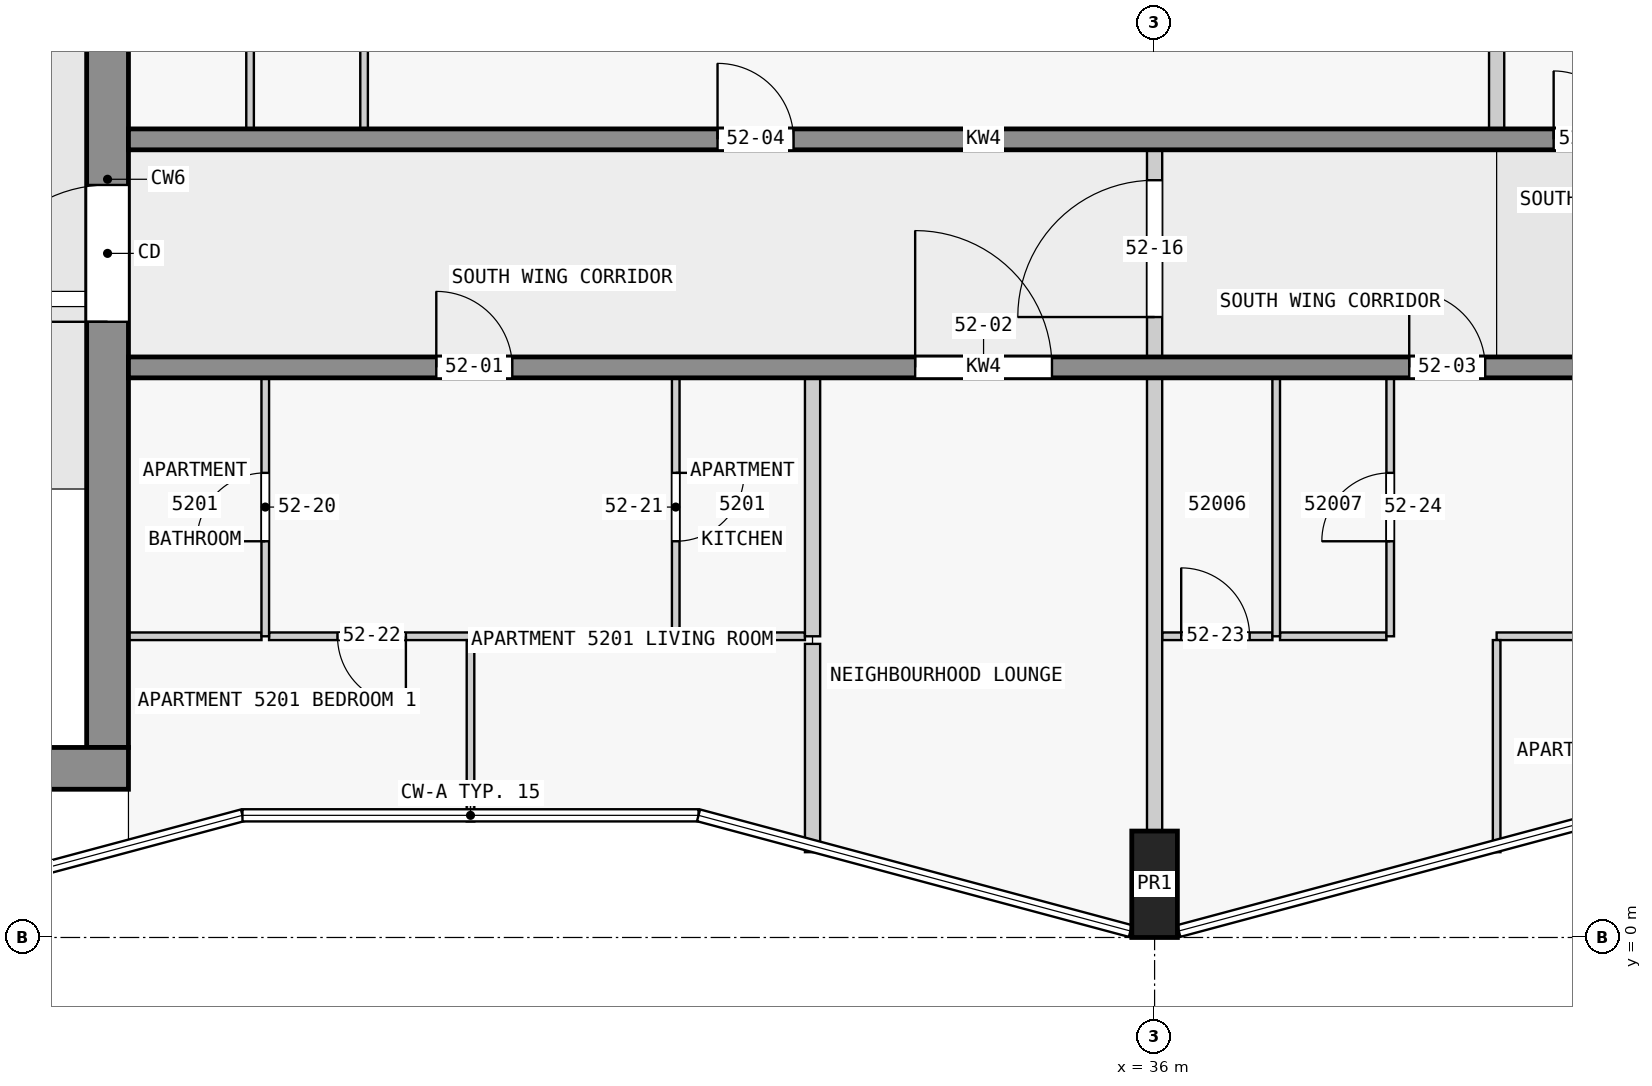
"""IFC4 building model, lengths in metres.
Left out: names, types, materials, properties, quantities, classifications, styles, units other than length and angle.
Written with IfcOpenShell. Run it as: python <this file> out.ifc"""

import sys

from ifc_helpers import new_model, si_unit, direction, frame, frame_2d, origin, origin_2d, place, context, subcontext, project, spatial, rectangle, extrude, element, fill, save


model = new_model("IFC4")
c1 = context("Model", 3, precision=1e-05, world=origin(), true_north=direction((0.0, 1.0)))
c2 = subcontext(c1, "Body", "Model", "MODEL_VIEW")
j1 = project(units=[si_unit("LENGTHUNIT", "METRE"), si_unit("PLANEANGLEUNIT", "RADIAN")], contexts=[c1])
p1 = place(None, origin())
s1 = spatial("IfcSite", under=j1, at=p1, CompositionType="ELEMENT")
p2 = place(p1, origin())
s2 = spatial("IfcBuilding", under=s1, at=p2, CompositionType="ELEMENT")
p3 = place(p2, frame((0.0, 0.0, 201.4)))
s3 = spatial("IfcBuildingStorey", under=s2, at=p3, CompositionType="ELEMENT", Elevation=201.4)
p4 = place(p3, frame((36.0, 0.7, 0.0), z_axis=(0.0, 0.0, 1.0), x_axis=(1.0, 0.0, 0.0)))
e1 = element("IfcColumn", 1, at=p4, inside=s3, PredefinedType="COLUMN", context=c2, shape_type="SweptSolid", body=[
    extrude(rectangle(XDim=0.6, YDim=1.4, at=origin_2d()), origin(), (0.0, 0.0, 1.0), 3.5),
])
p5 = place(p3, frame((1.75, 2.225, 0.0), z_axis=(0.0, 0.0, 1.0), x_axis=(1.0, 0.0, 0.0)))
e2 = element("IfcWall", 2, at=p5, inside=s3, PredefinedType="SHEAR", context=c2, shape_type="SweptSolid", body=[
    extrude(rectangle(XDim=20.75, YDim=0.55, at=frame_2d((10.375, 0.0))), origin(), (0.0, 0.0, 1.0), 3.25),
])
p6 = place(p3, frame((22.225, 2.5, 0.0), z_axis=(0.0, 0.0, 1.0), x_axis=(0.0, 1.0, 0.0)))
e3 = element("IfcWall", 3, at=p6, inside=s3, PredefinedType="SHEAR", context=c2, shape_type="SweptSolid", body=[
    extrude(rectangle(XDim=14.95, YDim=0.55, at=frame_2d((7.475, 0.0))), origin(), (0.0, 0.0, 1.0), 3.25),
])
p7 = place(p6, frame((5.6, 0.0, 0.0)))
e4 = element("IfcOpeningElement", 4, at=p7, cuts=e3, PredefinedType="OPENING", context=c2, shape_type="SweptSolid", body=[
    extrude(rectangle(XDim=1.8, YDim=2.1, at=frame_2d((0.9, 1.05))), frame((0.0, 0.285, 0.0), z_axis=(0.0, -1.0, 0.0), x_axis=(1.0, 0.0, 0.0)), (0.0, 0.0, 1.0), 0.57),
])
p8 = place(p3, frame((22.5, 7.5, 0.0), z_axis=(0.0, 0.0, 1.0), x_axis=(1.0, 0.0, 0.0)))
e5 = element("IfcWall", 5, at=p8, inside=s3, PredefinedType="SHEAR", context=c2, shape_type="SweptSolid", body=[
    extrude(rectangle(XDim=22.5, YDim=0.275, at=frame_2d((11.25, 0.0))), origin(), (0.0, 0.0, 1.0), 3.25),
])
p9 = place(p8, frame((4.05, 0.0, 0.0)))
e6 = element("IfcOpeningElement", 6, at=p9, cuts=e5, PredefinedType="OPENING", context=c2, shape_type="SweptSolid", body=[
    extrude(rectangle(XDim=1.0, YDim=2.1, at=frame_2d((0.5, 1.05))), frame((0.0, 0.147, 0.0), z_axis=(0.0, -1.0, 0.0), x_axis=(1.0, 0.0, 0.0)), (0.0, 0.0, 1.0), 0.295),
])
p10 = place(p8, frame((10.35, 0.0, 0.0)))
e7 = element("IfcOpeningElement", 7, at=p10, cuts=e5, PredefinedType="OPENING", context=c2, shape_type="SweptSolid", body=[
    extrude(rectangle(XDim=1.8, YDim=2.1, at=frame_2d((0.9, 1.05))), frame((0.0, 0.147, 0.0), z_axis=(0.0, -1.0, 0.0), x_axis=(1.0, 0.0, 0.0)), (0.0, 0.0, 1.0), 0.295),
])
p11 = place(p8, frame((16.85, 0.0, 0.0)))
e8 = element("IfcOpeningElement", 8, at=p11, cuts=e5, PredefinedType="OPENING", context=c2, shape_type="SweptSolid", body=[
    extrude(rectangle(XDim=1.0, YDim=2.1, at=frame_2d((0.5, 1.05))), frame((0.0, 0.147, 0.0), z_axis=(0.0, -1.0, 0.0), x_axis=(1.0, 0.0, 0.0)), (0.0, 0.0, 1.0), 0.295),
])
p12 = place(p3, frame((22.5, 10.5, 0.0), z_axis=(0.0, 0.0, 1.0), x_axis=(1.0, 0.0, 0.0)))
e9 = element("IfcWall", 9, at=p12, inside=s3, PredefinedType="SHEAR", context=c2, shape_type="SweptSolid", body=[
    extrude(rectangle(XDim=22.5, YDim=0.275, at=frame_2d((11.25, 0.0))), origin(), (0.0, 0.0, 1.0), 3.25),
])
p13 = place(p12, frame((7.75, 0.0, 0.0)))
e10 = element("IfcOpeningElement", 10, at=p13, cuts=e9, PredefinedType="OPENING", context=c2, shape_type="SweptSolid", body=[
    extrude(rectangle(XDim=1.0, YDim=2.1, at=frame_2d((0.5, 1.05))), frame((0.0, 0.147, 0.0), z_axis=(0.0, -1.0, 0.0), x_axis=(1.0, 0.0, 0.0)), (0.0, 0.0, 1.0), 0.295),
])
p14 = place(p12, frame((18.75, 0.0, 0.0)))
e11 = element("IfcOpeningElement", 11, at=p14, cuts=e9, PredefinedType="OPENING", context=c2, shape_type="SweptSolid", body=[
    extrude(rectangle(XDim=0.9, YDim=2.1, at=frame_2d((0.45, 1.05))), frame((0.0, 0.147, 0.0), z_axis=(0.0, -1.0, 0.0), x_axis=(1.0, 0.0, 0.0)), (0.0, 0.0, 1.0), 0.295),
])
p15 = place(p12, frame((20.95, 0.0, 0.0)))
e12 = element("IfcOpeningElement", 12, at=p15, cuts=e9, PredefinedType="OPENING", context=c2, shape_type="SweptSolid", body=[
    extrude(rectangle(XDim=1.0, YDim=2.1, at=frame_2d((0.5, 1.05))), frame((0.0, 0.147, 0.0), z_axis=(0.0, -1.0, 0.0), x_axis=(1.0, 0.0, 0.0)), (0.0, 0.0, 1.0), 0.295),
])
p16 = place(p3, frame((27.0, 3.962, 0.0), z_axis=(0.0, 0.0, 1.0), x_axis=(-1.0, 0.0, 0.0)))
e13 = element("IfcWall", 13, at=p16, inside=s3, PredefinedType="PARTITIONING", context=c2, shape_type="SweptSolid", body=[
    extrude(rectangle(XDim=2.65, YDim=0.1, at=frame_2d((1.325, 0.0))), origin(), (0.0, 0.0, 1.0), 3.25),
])
p17 = place(p16, frame((0.85, 0.0, 0.0)))
e14 = element("IfcOpeningElement", 14, at=p17, cuts=e13, PredefinedType="OPENING", context=c2, shape_type="SweptSolid", body=[
    extrude(rectangle(XDim=0.9, YDim=2.1, at=frame_2d((0.45, 1.05))), frame((0.0, 0.06, 0.0), z_axis=(0.0, -1.0, 0.0), x_axis=(1.0, 0.0, 0.0)), (0.0, 0.0, 1.0), 0.12),
])
p18 = place(p3, frame((54.08, 3.962, 0.0), z_axis=(0.0, 0.0, 1.0), x_axis=(-1.0, 0.0, 0.0)))
e15 = element("IfcWall", 15, at=p18, inside=s3, PredefinedType="PARTITIONING", context=c2, shape_type="SweptSolid", body=[
    extrude(rectangle(XDim=13.58, YDim=0.1, at=frame_2d((6.79, 0.0))), origin(), (0.0, 0.0, 1.0), 3.25),
])
p19 = place(p18, frame((10.85, 0.0, 0.0)))
e16 = element("IfcOpeningElement", 16, at=p19, cuts=e15, PredefinedType="OPENING", context=c2, shape_type="SweptSolid", body=[
    extrude(rectangle(XDim=0.9, YDim=2.1, at=frame_2d((0.45, 1.05))), frame((0.0, 0.06, 0.0), z_axis=(0.0, -1.0, 0.0), x_axis=(1.0, 0.0, 0.0)), (0.0, 0.0, 1.0), 0.12),
])
p20 = place(p18, frame((6.45, 0.0, 0.0)))
e17 = element("IfcOpeningElement", 17, at=p20, cuts=e15, PredefinedType="OPENING", context=c2, shape_type="SweptSolid", body=[
    extrude(rectangle(XDim=0.9, YDim=2.1, at=frame_2d((0.45, 1.05))), frame((0.0, 0.06, 0.0), z_axis=(0.0, -1.0, 0.0), x_axis=(1.0, 0.0, 0.0)), (0.0, 0.0, 1.0), 0.12),
])
p21 = place(p18, frame((2.75, 0.0, 0.0)))
e18 = element("IfcOpeningElement", 18, at=p21, cuts=e15, PredefinedType="OPENING", context=c2, shape_type="SweptSolid", body=[
    extrude(rectangle(XDim=0.9, YDim=2.1, at=frame_2d((0.45, 1.05))), frame((0.0, 0.06, 0.0), z_axis=(0.0, -1.0, 0.0), x_axis=(1.0, 0.0, 0.0)), (0.0, 0.0, 1.0), 0.12),
])
p22 = place(p3, frame((22.5, 3.962, 0.0), z_axis=(0.0, 0.0, 1.0), x_axis=(1.0, 0.0, 0.0)))
e19 = element("IfcWall", 19, at=p22, inside=s3, PredefinedType="PARTITIONING", context=c2, shape_type="SweptSolid", body=[
    extrude(rectangle(XDim=1.75, YDim=0.1, at=frame_2d((0.875, 0.0))), origin(), (0.0, 0.0, 1.0), 3.25),
])
p23 = place(p3, frame((29.75, 3.962, 0.0), z_axis=(0.0, 0.0, 1.0), x_axis=(1.0, 0.0, 0.0)))
e20 = element("IfcWall", 20, at=p23, inside=s3, PredefinedType="PARTITIONING", context=c2, shape_type="SweptSolid", body=[
    extrude(rectangle(XDim=1.65, YDim=0.1, at=frame_2d((0.825, 0.0))), origin(), (0.0, 0.0, 1.0), 3.25),
])
p24 = place(p3, frame((36.1, 3.962, 0.0), z_axis=(0.0, 0.0, 1.0), x_axis=(1.0, 0.0, 0.0)))
e21 = element("IfcWall", 21, at=p24, inside=s3, PredefinedType="PARTITIONING", context=c2, shape_type="SweptSolid", body=[
    extrude(rectangle(XDim=1.45, YDim=0.1, at=frame_2d((0.725, 0.0))), origin(), (0.0, 0.0, 1.0), 3.25),
])
p25 = place(p24, frame((0.25, 0.0, 0.0)))
e22 = element("IfcOpeningElement", 22, at=p25, cuts=e21, PredefinedType="OPENING", context=c2, shape_type="SweptSolid", body=[
    extrude(rectangle(XDim=0.9, YDim=2.1, at=frame_2d((0.45, 1.05))), frame((0.0, 0.06, 0.0), z_axis=(0.0, -1.0, 0.0), x_axis=(1.0, 0.0, 0.0)), (0.0, 0.0, 1.0), 0.12),
])
p26 = place(p3, frame((37.65, 3.962, 0.0), z_axis=(0.0, 0.0, 1.0), x_axis=(1.0, 0.0, 0.0)))
e23 = element("IfcWall", 23, at=p26, inside=s3, PredefinedType="PARTITIONING", context=c2, shape_type="SweptSolid", body=[
    extrude(rectangle(XDim=1.4, YDim=0.1, at=frame_2d((0.7, 0.0))), origin(), (0.0, 0.0, 1.0), 3.25),
])
p27 = place(p3, frame((24.1, 10.637, 0.0), z_axis=(0.0, 0.0, 1.0), x_axis=(0.0, 1.0, 0.0)))
e24 = element("IfcWall", 24, at=p27, inside=s3, PredefinedType="PARTITIONING", context=c2, shape_type="SweptSolid", body=[
    extrude(rectangle(XDim=3.4, YDim=0.1, at=frame_2d((1.7, 0.0))), origin(), (0.0, 0.0, 1.0), 3.25),
])
p28 = place(p3, frame((24.3, 3.962, 0.0), z_axis=(0.0, 0.0, 1.0), x_axis=(0.0, 1.0, 0.0)))
e25 = element("IfcWall", 25, at=p28, inside=s3, PredefinedType="PARTITIONING", context=c2, shape_type="SweptSolid", body=[
    extrude(rectangle(XDim=3.4, YDim=0.1, at=frame_2d((1.7, 0.0))), origin(), (0.0, 0.0, 1.0), 3.25),
])
p29 = place(p28, frame((1.25, 0.0, 0.0)))
e26 = element("IfcOpeningElement", 26, at=p29, cuts=e25, PredefinedType="OPENING", context=c2, shape_type="SweptSolid", body=[
    extrude(rectangle(XDim=0.9, YDim=2.1, at=frame_2d((0.45, 1.05))), frame((0.0, 0.06, 0.0), z_axis=(0.0, -1.0, 0.0), x_axis=(1.0, 0.0, 0.0)), (0.0, 0.0, 1.0), 0.12),
])
p30 = place(p3, frame((25.6, 10.637, 0.0), z_axis=(0.0, 0.0, 1.0), x_axis=(0.0, 1.0, 0.0)))
e27 = element("IfcWall", 27, at=p30, inside=s3, PredefinedType="PARTITIONING", context=c2, shape_type="SweptSolid", body=[
    extrude(rectangle(XDim=3.4, YDim=0.1, at=frame_2d((1.7, 0.0))), origin(), (0.0, 0.0, 1.0), 3.25),
])
p31 = place(p30, frame((1.25, 0.0, 0.0)))
e28 = element("IfcOpeningElement", 28, at=p31, cuts=e27, PredefinedType="OPENING", context=c2, shape_type="SweptSolid", body=[
    extrude(rectangle(XDim=0.9, YDim=2.1, at=frame_2d((0.45, 1.05))), frame((0.0, 0.06, 0.0), z_axis=(0.0, -1.0, 0.0), x_axis=(1.0, 0.0, 0.0)), (0.0, 0.0, 1.0), 0.12),
])
p32 = place(p3, frame((27.0, 1.527, 0.0), z_axis=(0.0, 0.0, 1.0), x_axis=(0.0, 1.0, 0.0)))
e29 = element("IfcWall", 29, at=p32, inside=s3, PredefinedType="PARTITIONING", context=c2, shape_type="SweptSolid", body=[
    extrude(rectangle(XDim=2.386, YDim=0.1, at=frame_2d((1.193, 0.0))), origin(), (0.0, 0.0, 1.0), 3.25),
])
p33 = place(p3, frame((29.7, 7.363, 0.0), z_axis=(0.0, 0.0, 1.0), x_axis=(0.0, -1.0, 0.0)))
e30 = element("IfcWall", 30, at=p33, inside=s3, PredefinedType="PARTITIONING", context=c2, shape_type="SweptSolid", body=[
    extrude(rectangle(XDim=3.4, YDim=0.1, at=frame_2d((1.7, 0.0))), origin(), (0.0, 0.0, 1.0), 3.25),
])
p34 = place(p33, frame((1.25, 0.0, 0.0)))
e31 = element("IfcOpeningElement", 31, at=p34, cuts=e30, PredefinedType="OPENING", context=c2, shape_type="SweptSolid", body=[
    extrude(rectangle(XDim=0.9, YDim=2.1, at=frame_2d((0.45, 1.05))), frame((0.0, 0.06, 0.0), z_axis=(0.0, -1.0, 0.0), x_axis=(1.0, 0.0, 0.0)), (0.0, 0.0, 1.0), 0.12),
])
p35 = place(p3, frame((31.5, 3.863, 0.0), z_axis=(0.0, 0.0, 1.0), x_axis=(0.0, -1.0, 0.0)))
e32 = element("IfcWall", 32, at=p35, inside=s3, PredefinedType="PARTITIONING", context=c2, shape_type="SweptSolid", body=[
    extrude(rectangle(XDim=2.74, YDim=0.2, at=frame_2d((1.37, 0.0))), origin(), (0.0, 0.0, 1.0), 3.25),
])
p36 = place(p3, frame((31.5, 3.962, 0.0), z_axis=(0.0, 0.0, 1.0), x_axis=(0.0, 1.0, 0.0)))
e33 = element("IfcWall", 33, at=p36, inside=s3, PredefinedType="PARTITIONING", context=c2, shape_type="SweptSolid", body=[
    extrude(rectangle(XDim=3.4, YDim=0.2, at=frame_2d((1.7, 0.0))), origin(), (0.0, 0.0, 1.0), 3.25),
])
p37 = place(p3, frame((36.0, 1.4, 0.0), z_axis=(0.0, 0.0, 1.0), x_axis=(0.0, 1.0, 0.0)))
e34 = element("IfcWall", 34, at=p37, inside=s3, PredefinedType="PARTITIONING", context=c2, shape_type="SweptSolid", body=[
    extrude(rectangle(XDim=5.963, YDim=0.2, at=frame_2d((2.981, 0.0))), origin(), (0.0, 0.0, 1.0), 3.25),
])
p38 = place(p3, frame((37.6, 3.962, 0.0), z_axis=(0.0, 0.0, 1.0), x_axis=(0.0, 1.0, 0.0)))
e35 = element("IfcWall", 35, at=p38, inside=s3, PredefinedType="PARTITIONING", context=c2, shape_type="SweptSolid", body=[
    extrude(rectangle(XDim=3.4, YDim=0.1, at=frame_2d((1.7, 0.0))), origin(), (0.0, 0.0, 1.0), 3.25),
])
p39 = place(p3, frame((39.1, 3.962, 0.0), z_axis=(0.0, 0.0, 1.0), x_axis=(0.0, 1.0, 0.0)))
e36 = element("IfcWall", 36, at=p39, inside=s3, PredefinedType="PARTITIONING", context=c2, shape_type="SweptSolid", body=[
    extrude(rectangle(XDim=3.4, YDim=0.1, at=frame_2d((1.7, 0.0))), origin(), (0.0, 0.0, 1.0), 3.25),
])
p40 = place(p39, frame((1.25, 0.0, 0.0)))
e37 = element("IfcOpeningElement", 37, at=p40, cuts=e36, PredefinedType="OPENING", context=c2, shape_type="SweptSolid", body=[
    extrude(rectangle(XDim=0.9, YDim=2.1, at=frame_2d((0.45, 1.05))), frame((0.0, 0.06, 0.0), z_axis=(0.0, -1.0, 0.0), x_axis=(1.0, 0.0, 0.0)), (0.0, 0.0, 1.0), 0.12),
])
p41 = place(p3, frame((40.5, 3.913, 0.0), z_axis=(0.0, 0.0, 1.0), x_axis=(0.0, -1.0, 0.0)))
e38 = element("IfcWall", 38, at=p41, inside=s3, PredefinedType="PARTITIONING", context=c2, shape_type="SweptSolid", body=[
    extrude(rectangle(XDim=2.79, YDim=0.1, at=frame_2d((1.395, 0.0))), origin(), (0.0, 0.0, 1.0), 3.25),
])
p42 = place(p3, frame((40.5, 14.038, 0.0), z_axis=(0.0, 0.0, 1.0), x_axis=(0.0, -1.0, 0.0)))
e39 = element("IfcWall", 39, at=p42, inside=s3, PredefinedType="PARTITIONING", context=c2, shape_type="SweptSolid", body=[
    extrude(rectangle(XDim=3.4, YDim=0.2, at=frame_2d((1.7, 0.0))), origin(), (0.0, 0.0, 1.0), 3.25),
])
p43 = place(p3, frame((36.0, 7.462, 0.0), z_axis=(0.0, 0.0, 1.0), x_axis=(0.0, 1.0, 0.0)))
e40 = element("IfcWall", 40, at=p43, inside=s3, PredefinedType="PARTITIONING", context=c2, shape_type="SweptSolid", body=[
    extrude(rectangle(XDim=3.175, YDim=0.2, at=frame_2d((1.587, 0.0))), origin(), (0.0, 0.0, 1.0), 3.25),
])
p44 = place(p43, frame((0.7, 0.0, 0.0)))
e41 = element("IfcOpeningElement", 41, at=p44, cuts=e40, PredefinedType="OPENING", context=c2, shape_type="SweptSolid", body=[
    extrude(rectangle(XDim=1.8, YDim=2.1, at=frame_2d((0.9, 1.05))), frame((0.0, 0.11, 0.0), z_axis=(0.0, -1.0, 0.0), x_axis=(1.0, 0.0, 0.0)), (0.0, 0.0, 1.0), 0.22),
])
p45 = place(p7, origin())
e42 = element("IfcDoor", 42, at=p45, inside=s3, OperationType="DOUBLE_DOOR_SINGLE_SWING", PredefinedType="DOOR", context=c2, shape_type="SweptSolid", body=[
    extrude(rectangle(XDim=1.8, YDim=2.1, at=frame_2d((0.9, 1.05))), frame((0.0, 0.025, 0.0), z_axis=(0.0, -1.0, 0.0), x_axis=(1.0, 0.0, 0.0)), (0.0, 0.0, 1.0), 0.05),
])
fill(e4, e42)
p46 = place(p9, origin())
e43 = element("IfcDoor", 43, at=p46, inside=s3, OperationType="SINGLE_SWING_LEFT", PredefinedType="DOOR", context=c2, shape_type="SweptSolid", body=[
    extrude(rectangle(XDim=1.0, YDim=2.1, at=frame_2d((0.5, 1.05))), frame((0.0, 0.025, 0.0), z_axis=(0.0, -1.0, 0.0), x_axis=(1.0, 0.0, 0.0)), (0.0, 0.0, 1.0), 0.05),
])
fill(e6, e43)
p47 = place(p10, origin())
e44 = element("IfcDoor", 44, at=p47, inside=s3, OperationType="SINGLE_SWING_LEFT", PredefinedType="DOOR", context=c2, shape_type="SweptSolid", body=[
    extrude(rectangle(XDim=1.8, YDim=2.1, at=frame_2d((0.9, 1.05))), frame((0.0, 0.025, 0.0), z_axis=(0.0, -1.0, 0.0), x_axis=(1.0, 0.0, 0.0)), (0.0, 0.0, 1.0), 0.05),
])
fill(e7, e44)
p48 = place(p11, origin())
e45 = element("IfcDoor", 45, at=p48, inside=s3, OperationType="SINGLE_SWING_RIGHT", PredefinedType="DOOR", context=c2, shape_type="SweptSolid", body=[
    extrude(rectangle(XDim=1.0, YDim=2.1, at=frame_2d((0.5, 1.05))), frame((0.0, 0.025, 0.0), z_axis=(0.0, -1.0, 0.0), x_axis=(1.0, 0.0, 0.0)), (0.0, 0.0, 1.0), 0.05),
])
fill(e8, e45)
p49 = place(p13, origin())
e46 = element("IfcDoor", 46, at=p49, inside=s3, OperationType="SINGLE_SWING_LEFT", PredefinedType="DOOR", context=c2, shape_type="SweptSolid", body=[
    extrude(rectangle(XDim=1.0, YDim=2.1, at=frame_2d((0.5, 1.05))), frame((0.0, 0.025, 0.0), z_axis=(0.0, -1.0, 0.0), x_axis=(1.0, 0.0, 0.0)), (0.0, 0.0, 1.0), 0.05),
])
fill(e10, e46)
p50 = place(p14, origin())
e47 = element("IfcDoor", 47, at=p50, inside=s3, OperationType="SINGLE_SWING_RIGHT", PredefinedType="DOOR", context=c2, shape_type="SweptSolid", body=[
    extrude(rectangle(XDim=0.9, YDim=2.1, at=frame_2d((0.45, 1.05))), frame((0.0, 0.025, 0.0), z_axis=(0.0, -1.0, 0.0), x_axis=(1.0, 0.0, 0.0)), (0.0, 0.0, 1.0), 0.05),
])
fill(e11, e47)
p51 = place(p44, origin())
e48 = element("IfcDoor", 48, at=p51, inside=s3, OperationType="SINGLE_SWING_RIGHT", PredefinedType="DOOR", context=c2, shape_type="SweptSolid", body=[
    extrude(rectangle(XDim=1.8, YDim=2.1, at=frame_2d((0.9, 1.05))), frame((0.0, 0.025, 0.0), z_axis=(0.0, -1.0, 0.0), x_axis=(1.0, 0.0, 0.0)), (0.0, 0.0, 1.0), 0.05),
])
fill(e41, e48)
p52 = place(p29, origin())
e49 = element("IfcDoor", 49, at=p52, inside=s3, OperationType="SINGLE_SWING_LEFT", PredefinedType="DOOR", context=c2, shape_type="SweptSolid", body=[
    extrude(rectangle(XDim=0.9, YDim=2.1, at=frame_2d((0.45, 1.05))), frame((0.0, 0.025, 0.0), z_axis=(0.0, -1.0, 0.0), x_axis=(1.0, 0.0, 0.0)), (0.0, 0.0, 1.0), 0.05),
])
fill(e26, e49)
p53 = place(p34, origin())
e50 = element("IfcDoor", 50, at=p53, inside=s3, OperationType="SINGLE_SWING_LEFT", PredefinedType="DOOR", context=c2, shape_type="SweptSolid", body=[
    extrude(rectangle(XDim=0.9, YDim=2.1, at=frame_2d((0.45, 1.05))), frame((0.0, 0.025, 0.0), z_axis=(0.0, -1.0, 0.0), x_axis=(1.0, 0.0, 0.0)), (0.0, 0.0, 1.0), 0.05),
])
fill(e31, e50)
p54 = place(p17, origin())
e51 = element("IfcDoor", 51, at=p54, inside=s3, OperationType="SINGLE_SWING_LEFT", PredefinedType="DOOR", context=c2, shape_type="SweptSolid", body=[
    extrude(rectangle(XDim=0.9, YDim=2.1, at=frame_2d((0.45, 1.05))), frame((0.0, 0.025, 0.0), z_axis=(0.0, -1.0, 0.0), x_axis=(1.0, 0.0, 0.0)), (0.0, 0.0, 1.0), 0.05),
])
fill(e14, e51)
p55 = place(p25, origin())
e52 = element("IfcDoor", 52, at=p55, inside=s3, OperationType="SINGLE_SWING_LEFT", PredefinedType="DOOR", context=c2, shape_type="SweptSolid", body=[
    extrude(rectangle(XDim=0.9, YDim=2.1, at=frame_2d((0.45, 1.05))), frame((0.0, 0.025, 0.0), z_axis=(0.0, -1.0, 0.0), x_axis=(1.0, 0.0, 0.0)), (0.0, 0.0, 1.0), 0.05),
])
fill(e22, e52)
p56 = place(p40, origin())
e53 = element("IfcDoor", 53, at=p56, inside=s3, OperationType="SINGLE_SWING_LEFT", PredefinedType="DOOR", context=c2, shape_type="SweptSolid", body=[
    extrude(rectangle(XDim=0.9, YDim=2.1, at=frame_2d((0.45, 1.05))), frame((0.0, 0.025, 0.0), z_axis=(0.0, -1.0, 0.0), x_axis=(1.0, 0.0, 0.0)), (0.0, 0.0, 1.0), 0.05),
])
fill(e37, e53)
save(model, sys.argv[1])
